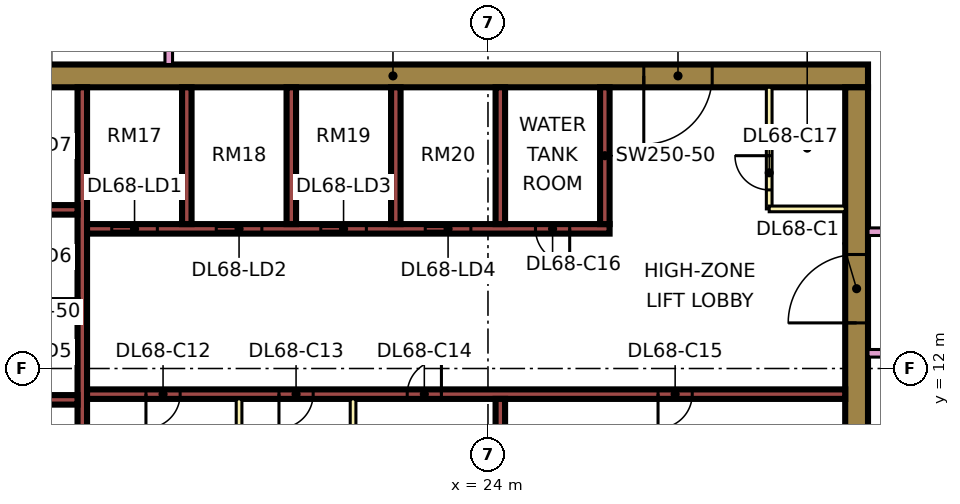
"""IFC4 building model, lengths in metres.
Left out: names, types, materials, properties, quantities, classifications, styles, units other than length and angle.
Written with IfcOpenShell. Run it as: python <this file> out.ifc"""

import sys

from ifc_helpers import new_model, si_unit, direction, frame, frame_2d, origin, place, context, subcontext, project, spatial, rectangle, extrude, element, fill, save


model = new_model("IFC4")
c1 = context("Model", 3, precision=1e-05, world=origin(), true_north=direction((0.0, 1.0)))
c2 = subcontext(c1, "Body", "Model", "MODEL_VIEW")
j1 = project(units=[si_unit("LENGTHUNIT", "METRE"), si_unit("PLANEANGLEUNIT", "RADIAN")], contexts=[c1])
p1 = place(None, origin())
s1 = spatial("IfcSite", under=j1, at=p1, CompositionType="ELEMENT")
p2 = place(p1, origin())
s2 = spatial("IfcBuilding", under=s1, at=p2, CompositionType="ELEMENT")
p3 = place(p2, frame((0.0, 0.0, 292.15)))
s3 = spatial("IfcBuildingStorey", under=s2, at=p3, CompositionType="ELEMENT", Elevation=292.15)
p4 = place(p3, frame((9.0, 19.7, 0.0), z_axis=(0.0, 0.0, 1.0), x_axis=(1.0, 0.0, 0.0)))
e1 = element("IfcWall", 1, at=p4, inside=s3, PredefinedType="SHEAR", context=c2, shape_type="SweptSolid", body=[
    extrude(rectangle(XDim=25.0, YDim=0.6, at=frame_2d((12.5, 0.0))), origin(), (0.0, 0.0, 1.0), 3.75),
])
p5 = place(p4, frame((19.1, 0.0, 0.0)))
e2 = element("IfcOpeningElement", 2, at=p5, cuts=e1, PredefinedType="OPENING", context=c2, shape_type="SweptSolid", body=[
    extrude(rectangle(XDim=1.8, YDim=2.4, at=frame_2d((0.9, 1.2))), frame((0.0, 0.31, 0.0), z_axis=(0.0, -1.0, 0.0), x_axis=(1.0, 0.0, 0.0)), (0.0, 0.0, 1.0), 0.62),
])
p6 = place(p3, frame((33.7, 7.6, 0.0), z_axis=(0.0, 0.0, 1.0), x_axis=(0.0, 1.0, 0.0)))
e3 = element("IfcWall", 3, at=p6, inside=s3, PredefinedType="SHEAR", context=c2, shape_type="SweptSolid", body=[
    extrude(rectangle(XDim=11.8, YDim=0.6, at=frame_2d((5.9, 0.0))), origin(), (0.0, 0.0, 1.0), 3.75),
])
p7 = place(p6, frame((5.6, 0.0, 0.0)))
e4 = element("IfcOpeningElement", 4, at=p7, cuts=e3, PredefinedType="OPENING", context=c2, shape_type="SweptSolid", body=[
    extrude(rectangle(XDim=1.8, YDim=2.4, at=frame_2d((0.9, 1.2))), frame((0.0, 0.31, 0.0), z_axis=(0.0, -1.0, 0.0), x_axis=(1.0, 0.0, 0.0)), (0.0, 0.0, 1.0), 0.62),
])
p8 = place(p3, frame((13.325, 7.6, 0.0), z_axis=(0.0, 0.0, 1.0), x_axis=(0.0, 1.0, 0.0)))
e5 = element("IfcWall", 5, at=p8, inside=s3, PredefinedType="SHEAR", context=c2, shape_type="SweptSolid", body=[
    extrude(rectangle(XDim=11.8, YDim=0.25, at=frame_2d((5.9, 0.0))), origin(), (0.0, 0.0, 1.0), 3.75),
])
p9 = place(p3, frame((13.45, 11.325, 0.0), z_axis=(0.0, 0.0, 1.0), x_axis=(1.0, 0.0, 0.0)))
e6 = element("IfcWall", 6, at=p9, inside=s3, PredefinedType="SHEAR", context=c2, shape_type="SweptSolid", body=[
    extrude(rectangle(XDim=19.95, YDim=0.25, at=frame_2d((9.975, 0.0))), origin(), (0.0, 0.0, 1.0), 3.75),
])
p10 = place(p9, frame((1.55, 0.0, 0.0)))
e7 = element("IfcOpeningElement", 7, at=p10, cuts=e6, PredefinedType="OPENING", context=c2, shape_type="SweptSolid", body=[
    extrude(rectangle(XDim=0.9, YDim=2.1, at=frame_2d((0.45, 1.05))), frame((0.0, 0.135, 0.0), z_axis=(0.0, -1.0, 0.0), x_axis=(1.0, 0.0, 0.0)), (0.0, 0.0, 1.0), 0.27),
])
p11 = place(p9, frame((5.05, 0.0, 0.0)))
e8 = element("IfcOpeningElement", 8, at=p11, cuts=e6, PredefinedType="OPENING", context=c2, shape_type="SweptSolid", body=[
    extrude(rectangle(XDim=0.9, YDim=2.1, at=frame_2d((0.45, 1.05))), frame((0.0, 0.135, 0.0), z_axis=(0.0, -1.0, 0.0), x_axis=(1.0, 0.0, 0.0)), (0.0, 0.0, 1.0), 0.27),
])
p12 = place(p9, frame((8.425, 0.0, 0.0)))
e9 = element("IfcOpeningElement", 9, at=p12, cuts=e6, PredefinedType="OPENING", context=c2, shape_type="SweptSolid", body=[
    extrude(rectangle(XDim=0.9, YDim=2.1, at=frame_2d((0.45, 1.05))), frame((0.0, 0.135, 0.0), z_axis=(0.0, -1.0, 0.0), x_axis=(1.0, 0.0, 0.0)), (0.0, 0.0, 1.0), 0.27),
])
p13 = place(p9, frame((15.025, 0.0, 0.0)))
e10 = element("IfcOpeningElement", 10, at=p13, cuts=e6, PredefinedType="OPENING", context=c2, shape_type="SweptSolid", body=[
    extrude(rectangle(XDim=0.9, YDim=2.1, at=frame_2d((0.45, 1.05))), frame((0.0, 0.135, 0.0), z_axis=(0.0, -1.0, 0.0), x_axis=(1.0, 0.0, 0.0)), (0.0, 0.0, 1.0), 0.27),
])
p14 = place(p3, frame((13.45, 15.675, 0.0), z_axis=(0.0, 0.0, 1.0), x_axis=(1.0, 0.0, 0.0)))
e11 = element("IfcWall", 11, at=p14, inside=s3, PredefinedType="SHEAR", context=c2, shape_type="SweptSolid", body=[
    extrude(rectangle(XDim=13.75, YDim=0.25, at=frame_2d((6.875, 0.0))), origin(), (0.0, 0.0, 1.0), 3.75),
])
p15 = place(p14, frame((0.65, 0.0, 0.0)))
e12 = element("IfcOpeningElement", 12, at=p15, cuts=e11, PredefinedType="OPENING", context=c2, shape_type="SweptSolid", body=[
    extrude(rectangle(XDim=1.2, YDim=2.2, at=frame_2d((0.6, 1.1))), frame((0.0, 0.135, 0.0), z_axis=(0.0, -1.0, 0.0), x_axis=(1.0, 0.0, 0.0)), (0.0, 0.0, 1.0), 0.27),
])
p16 = place(p14, frame((3.4, 0.0, 0.0)))
e13 = element("IfcOpeningElement", 13, at=p16, cuts=e11, PredefinedType="OPENING", context=c2, shape_type="SweptSolid", body=[
    extrude(rectangle(XDim=1.2, YDim=2.2, at=frame_2d((0.6, 1.1))), frame((0.0, 0.135, 0.0), z_axis=(0.0, -1.0, 0.0), x_axis=(1.0, 0.0, 0.0)), (0.0, 0.0, 1.0), 0.27),
])
p17 = place(p14, frame((6.15, 0.0, 0.0)))
e14 = element("IfcOpeningElement", 14, at=p17, cuts=e11, PredefinedType="OPENING", context=c2, shape_type="SweptSolid", body=[
    extrude(rectangle(XDim=1.2, YDim=2.2, at=frame_2d((0.6, 1.1))), frame((0.0, 0.135, 0.0), z_axis=(0.0, -1.0, 0.0), x_axis=(1.0, 0.0, 0.0)), (0.0, 0.0, 1.0), 0.27),
])
p18 = place(p14, frame((8.9, 0.0, 0.0)))
e15 = element("IfcOpeningElement", 15, at=p18, cuts=e11, PredefinedType="OPENING", context=c2, shape_type="SweptSolid", body=[
    extrude(rectangle(XDim=1.2, YDim=2.2, at=frame_2d((0.6, 1.1))), frame((0.0, 0.135, 0.0), z_axis=(0.0, -1.0, 0.0), x_axis=(1.0, 0.0, 0.0)), (0.0, 0.0, 1.0), 0.27),
])
p19 = place(p14, frame((11.8, 0.0, 0.0)))
e16 = element("IfcOpeningElement", 16, at=p19, cuts=e11, PredefinedType="OPENING", context=c2, shape_type="SweptSolid", body=[
    extrude(rectangle(XDim=0.9, YDim=2.1, at=frame_2d((0.45, 1.05))), frame((0.0, 0.135, 0.0), z_axis=(0.0, -1.0, 0.0), x_axis=(1.0, 0.0, 0.0)), (0.0, 0.0, 1.0), 0.27),
])
for number, where, z_axis, x_axis in (
    (17, (10.2, 11.175, 0.0), (0.0, 0.0, 1.0), (1.0, 0.0, 0.0)),
    (18, (10.2, 13.675, 0.0), (0.0, 0.0, 1.0), (1.0, 0.0, 0.0)),
    (19, (10.2, 16.175, 0.0), (0.0, 0.0, 1.0), (1.0, 0.0, 0.0)),
):
    element("IfcWall", number, at=place(p3, frame(where, z_axis=z_axis, x_axis=x_axis)), inside=s3, PredefinedType="SHEAR", context=c2, shape_type="SweptSolid", body=[
        extrude(rectangle(XDim=3.0, YDim=0.25, at=frame_2d((1.5, 0.0))), origin(), (0.0, 0.0, 1.0), 3.75),
    ])
for number, where, z_axis, x_axis in (
    (20, (24.325, 7.6, 0.0), (0.0, 0.0, 1.0), (0.0, 1.0, 0.0)),
    (21, (16.075, 15.8, 0.0), (0.0, 0.0, 1.0), (0.0, 1.0, 0.0)),
    (22, (18.825, 15.8, 0.0), (0.0, 0.0, 1.0), (0.0, 1.0, 0.0)),
    (23, (21.575, 15.8, 0.0), (0.0, 0.0, 1.0), (0.0, 1.0, 0.0)),
    (24, (24.325, 15.8, 0.0), (0.0, 0.0, 1.0), (0.0, 1.0, 0.0)),
    (25, (27.075, 15.8, 0.0), (0.0, 0.0, 1.0), (0.0, 1.0, 0.0)),
):
    element("IfcWall", number, at=place(p3, frame(where, z_axis=z_axis, x_axis=x_axis)), inside=s3, PredefinedType="SHEAR", context=c2, shape_type="SweptSolid", body=[
        extrude(rectangle(XDim=3.6, YDim=0.25, at=frame_2d((1.8, 0.0))), origin(), (0.0, 0.0, 1.0), 3.75),
    ])
p20 = place(p3, frame((-1.447, 12.553, 0.0), z_axis=(0.0, 0.0, 1.0), x_axis=(0.707106781187, -0.707106781187, 0.0)))
e26 = element("IfcWall", 26, at=p20, inside=s3, PredefinedType="SOLIDWALL", context=c2, shape_type="SweptSolid", body=[
    extrude(rectangle(XDim=19.799, YDim=0.15, at=frame_2d((9.899, 0.0))), origin(), (0.0, 0.0, 1.0), 3.35),
])
p21 = place(p20, frame((2.212, 0.0, 0.45)))
e27 = element("IfcOpeningElement", 27, at=p21, cuts=e26, PredefinedType="OPENING", context=c2, shape_type="SweptSolid", body=[
    extrude(rectangle(XDim=3.0, YDim=2.4, at=frame_2d((1.5, 1.2))), frame((0.0, 0.085, 0.0), z_axis=(0.0, -1.0, 0.0), x_axis=(1.0, 0.0, 0.0)), (0.0, 0.0, 1.0), 0.17),
])
p22 = place(p20, frame((10.216, 0.0, 0.45)))
e28 = element("IfcOpeningElement", 28, at=p22, cuts=e26, PredefinedType="OPENING", context=c2, shape_type="SweptSolid", body=[
    extrude(rectangle(XDim=3.0, YDim=2.4, at=frame_2d((1.5, 1.2))), frame((0.0, 0.085, 0.0), z_axis=(0.0, -1.0, 0.0), x_axis=(1.0, 0.0, 0.0)), (0.0, 0.0, 1.0), 0.17),
])
for number, where, z_axis, x_axis in (
    (29, (17.45, 7.6, 0.0), (0.0, 0.0, 1.0), (0.0, 1.0, 0.0)),
    (30, (20.45, 7.6, 0.0), (0.0, 0.0, 1.0), (0.0, 1.0, 0.0)),
):
    element("IfcWall", number, at=place(p3, frame(where, z_axis=z_axis, x_axis=x_axis)), inside=s3, PredefinedType="PARTITIONING", context=c2, shape_type="SweptSolid", body=[
        extrude(rectangle(XDim=3.6, YDim=0.15, at=frame_2d((1.8, 0.0))), origin(), (0.0, 0.0, 1.0), 3.35),
    ])
p23 = place(p3, frame((31.4, 16.2, 0.0), z_axis=(0.0, 0.0, 1.0), x_axis=(0.0, 1.0, 0.0)))
e31 = element("IfcWall", 31, at=p23, inside=s3, PredefinedType="PARTITIONING", context=c2, shape_type="SweptSolid", body=[
    extrude(rectangle(XDim=3.2, YDim=0.15, at=frame_2d((1.6, 0.0))), origin(), (0.0, 0.0, 1.0), 3.35),
])
p24 = place(p23, frame((0.5, 0.0, 0.0)))
e32 = element("IfcOpeningElement", 32, at=p24, cuts=e31, PredefinedType="OPENING", context=c2, shape_type="SweptSolid", body=[
    extrude(rectangle(XDim=0.9, YDim=2.1, at=frame_2d((0.45, 1.05))), frame((0.0, 0.085, 0.0), z_axis=(0.0, -1.0, 0.0), x_axis=(1.0, 0.0, 0.0)), (0.0, 0.0, 1.0), 0.17),
])
p25 = place(p3, frame((31.4, 16.2, 0.0), z_axis=(0.0, 0.0, 1.0), x_axis=(1.0, 0.0, 0.0)))
e33 = element("IfcWall", 33, at=p25, inside=s3, PredefinedType="PARTITIONING", context=c2, shape_type="SweptSolid", body=[
    extrude(rectangle(XDim=2.0, YDim=0.15, at=frame_2d((1.0, 0.0))), origin(), (0.0, 0.0, 1.0), 3.35),
])
p26 = place(p3, frame((15.6, 20.0, 0.0), z_axis=(0.0, 0.0, 1.0), x_axis=(0.0, 1.0, 0.0)))
e34 = element("IfcWall", 34, at=p26, inside=s3, PredefinedType="PARTITIONING", context=c2, shape_type="SweptSolid", body=[
    extrude(rectangle(XDim=27.775, YDim=0.2, at=frame_2d((13.887, 0.0))), origin(), (0.0, 0.0, 1.0), 3.35),
])
p27 = place(p26, frame((7.15, 0.0, 0.0)))
e35 = element("IfcOpeningElement", 35, at=p27, cuts=e34, PredefinedType="OPENING", context=c2, shape_type="SweptSolid", body=[
    extrude(rectangle(XDim=1.6, YDim=2.1, at=frame_2d((0.8, 1.05))), frame((0.0, 0.11, 0.0), z_axis=(0.0, -1.0, 0.0), x_axis=(1.0, 0.0, 0.0)), (0.0, 0.0, 1.0), 0.22),
])
p28 = place(p26, frame((13.5, 0.0, 0.0)))
e36 = element("IfcOpeningElement", 36, at=p28, cuts=e34, PredefinedType="OPENING", context=c2, shape_type="SweptSolid", body=[
    extrude(rectangle(XDim=1.0, YDim=2.1, at=frame_2d((0.5, 1.05))), frame((0.0, 0.11, 0.0), z_axis=(0.0, -1.0, 0.0), x_axis=(1.0, 0.0, 0.0)), (0.0, 0.0, 1.0), 0.22),
])
p29 = place(p26, frame((22.75, 0.0, 0.0)))
e37 = element("IfcOpeningElement", 37, at=p29, cuts=e34, PredefinedType="OPENING", context=c2, shape_type="SweptSolid", body=[
    extrude(rectangle(XDim=1.0, YDim=2.1, at=frame_2d((0.5, 1.05))), frame((0.0, 0.11, 0.0), z_axis=(0.0, -1.0, 0.0), x_axis=(1.0, 0.0, 0.0)), (0.0, 0.0, 1.0), 0.22),
])
p30 = place(p26, frame((1.15, 0.0, 0.0)))
e38 = element("IfcOpeningElement", 38, at=p30, cuts=e34, PredefinedType="OPENING", context=c2, shape_type="SweptSolid", body=[
    extrude(rectangle(XDim=1.8, YDim=2.1, at=frame_2d((0.9, 1.05))), frame((0.0, 0.11, 0.0), z_axis=(0.0, -1.0, 0.0), x_axis=(1.0, 0.0, 0.0)), (0.0, 0.0, 1.0), 0.22),
])
p31 = place(p26, frame((25.9, 0.0, 0.0)))
e39 = element("IfcOpeningElement", 39, at=p31, cuts=e34, PredefinedType="OPENING", context=c2, shape_type="SweptSolid", body=[
    extrude(rectangle(XDim=1.0, YDim=2.1, at=frame_2d((0.5, 1.05))), frame((0.0, 0.11, 0.0), z_axis=(0.0, -1.0, 0.0), x_axis=(1.0, 0.0, 0.0)), (0.0, 0.0, 1.0), 0.22),
])
p32 = place(p3, frame((34.0, 12.4, 0.0), z_axis=(0.0, 0.0, 1.0), x_axis=(1.0, 0.0, 0.0)))
e40 = element("IfcWall", 40, at=p32, inside=s3, PredefinedType="PARTITIONING", context=c2, shape_type="SweptSolid", body=[
    extrude(rectangle(XDim=2.401, YDim=0.2, at=frame_2d((1.2, 0.0))), origin(), (0.0, 0.0, 1.0), 3.35),
])
p33 = place(p3, frame((34.0, 15.6, 0.0), z_axis=(0.0, 0.0, 1.0), x_axis=(1.0, 0.0, 0.0)))
e41 = element("IfcWall", 41, at=p33, inside=s3, PredefinedType="PARTITIONING", context=c2, shape_type="SweptSolid", body=[
    extrude(rectangle(XDim=10.35, YDim=0.2, at=frame_2d((5.175, 0.0))), origin(), (0.0, 0.0, 1.0), 3.35),
])
p34 = place(p33, frame((5.6, 0.0, 0.0)))
e42 = element("IfcOpeningElement", 42, at=p34, cuts=e41, PredefinedType="OPENING", context=c2, shape_type="SweptSolid", body=[
    extrude(rectangle(XDim=1.0, YDim=2.1, at=frame_2d((0.5, 1.05))), frame((0.0, 0.11, 0.0), z_axis=(0.0, -1.0, 0.0), x_axis=(1.0, 0.0, 0.0)), (0.0, 0.0, 1.0), 0.22),
])
p35 = place(p33, frame((0.45, 0.0, 0.0)))
e43 = element("IfcOpeningElement", 43, at=p35, cuts=e41, PredefinedType="OPENING", context=c2, shape_type="SweptSolid", body=[
    extrude(rectangle(XDim=1.2, YDim=2.1, at=frame_2d((0.6, 1.05))), frame((0.0, 0.11, 0.0), z_axis=(0.0, -1.0, 0.0), x_axis=(1.0, 0.0, 0.0)), (0.0, 0.0, 1.0), 0.22),
])
p36 = place(p15, origin())
e44 = element("IfcDoor", 44, at=p36, inside=s3, OperationType="DOUBLE_DOOR_SLIDING", PredefinedType="DOOR", context=c2, shape_type="SweptSolid", body=[
    extrude(rectangle(XDim=1.2, YDim=2.2, at=frame_2d((0.6, 1.1))), frame((0.0, 0.025, 0.0), z_axis=(0.0, -1.0, 0.0), x_axis=(1.0, 0.0, 0.0)), (0.0, 0.0, 1.0), 0.05),
])
fill(e12, e44)
p37 = place(p16, origin())
e45 = element("IfcDoor", 45, at=p37, inside=s3, OperationType="DOUBLE_DOOR_SLIDING", PredefinedType="DOOR", context=c2, shape_type="SweptSolid", body=[
    extrude(rectangle(XDim=1.2, YDim=2.2, at=frame_2d((0.6, 1.1))), frame((0.0, 0.025, 0.0), z_axis=(0.0, -1.0, 0.0), x_axis=(1.0, 0.0, 0.0)), (0.0, 0.0, 1.0), 0.05),
])
fill(e13, e45)
p38 = place(p17, origin())
e46 = element("IfcDoor", 46, at=p38, inside=s3, OperationType="DOUBLE_DOOR_SLIDING", PredefinedType="DOOR", context=c2, shape_type="SweptSolid", body=[
    extrude(rectangle(XDim=1.2, YDim=2.2, at=frame_2d((0.6, 1.1))), frame((0.0, 0.025, 0.0), z_axis=(0.0, -1.0, 0.0), x_axis=(1.0, 0.0, 0.0)), (0.0, 0.0, 1.0), 0.05),
])
fill(e14, e46)
p39 = place(p18, origin())
e47 = element("IfcDoor", 47, at=p39, inside=s3, OperationType="DOUBLE_DOOR_SLIDING", PredefinedType="DOOR", context=c2, shape_type="SweptSolid", body=[
    extrude(rectangle(XDim=1.2, YDim=2.2, at=frame_2d((0.6, 1.1))), frame((0.0, 0.025, 0.0), z_axis=(0.0, -1.0, 0.0), x_axis=(1.0, 0.0, 0.0)), (0.0, 0.0, 1.0), 0.05),
])
fill(e15, e47)
p40 = place(p7, origin())
e48 = element("IfcDoor", 48, at=p40, inside=s3, OperationType="DOUBLE_DOOR_SINGLE_SWING", PredefinedType="DOOR", context=c2, shape_type="SweptSolid", body=[
    extrude(rectangle(XDim=1.8, YDim=2.4, at=frame_2d((0.9, 1.2))), frame((0.0, 0.025, 0.0), z_axis=(0.0, -1.0, 0.0), x_axis=(1.0, 0.0, 0.0)), (0.0, 0.0, 1.0), 0.05),
])
fill(e4, e48)
p41 = place(p5, frame((1.8, 0.0, 0.0), z_axis=(0.0, 0.0, 1.0), x_axis=(-1.0, 0.0, 0.0)))
e49 = element("IfcDoor", 49, at=p41, inside=s3, OperationType="DOUBLE_DOOR_SINGLE_SWING", PredefinedType="DOOR", context=c2, shape_type="SweptSolid", body=[
    extrude(rectangle(XDim=1.8, YDim=2.4, at=frame_2d((0.9, 1.2))), frame((0.0, 0.025, 0.0), z_axis=(0.0, -1.0, 0.0), x_axis=(1.0, 0.0, 0.0)), (0.0, 0.0, 1.0), 0.05),
])
fill(e2, e49)
p42 = place(p10, frame((0.9, 0.0, 0.0), z_axis=(0.0, 0.0, 1.0), x_axis=(-1.0, 0.0, 0.0)))
e50 = element("IfcDoor", 50, at=p42, inside=s3, OperationType="SINGLE_SWING_LEFT", PredefinedType="DOOR", context=c2, shape_type="SweptSolid", body=[
    extrude(rectangle(XDim=0.9, YDim=2.1, at=frame_2d((0.45, 1.05))), frame((0.0, 0.025, 0.0), z_axis=(0.0, -1.0, 0.0), x_axis=(1.0, 0.0, 0.0)), (0.0, 0.0, 1.0), 0.05),
])
fill(e7, e50)
p43 = place(p11, frame((0.9, 0.0, 0.0), z_axis=(0.0, 0.0, 1.0), x_axis=(-1.0, 0.0, 0.0)))
e51 = element("IfcDoor", 51, at=p43, inside=s3, OperationType="SINGLE_SWING_LEFT", PredefinedType="DOOR", context=c2, shape_type="SweptSolid", body=[
    extrude(rectangle(XDim=0.9, YDim=2.1, at=frame_2d((0.45, 1.05))), frame((0.0, 0.025, 0.0), z_axis=(0.0, -1.0, 0.0), x_axis=(1.0, 0.0, 0.0)), (0.0, 0.0, 1.0), 0.05),
])
fill(e8, e51)
p44 = place(p12, frame((0.9, 0.0, 0.0), z_axis=(0.0, 0.0, 1.0), x_axis=(-1.0, 0.0, 0.0)))
e52 = element("IfcDoor", 52, at=p44, inside=s3, OperationType="SINGLE_SWING_RIGHT", PredefinedType="DOOR", context=c2, shape_type="SweptSolid", body=[
    extrude(rectangle(XDim=0.9, YDim=2.1, at=frame_2d((0.45, 1.05))), frame((0.0, 0.025, 0.0), z_axis=(0.0, -1.0, 0.0), x_axis=(1.0, 0.0, 0.0)), (0.0, 0.0, 1.0), 0.05),
])
fill(e9, e52)
p45 = place(p13, frame((0.9, 0.0, 0.0), z_axis=(0.0, 0.0, 1.0), x_axis=(-1.0, 0.0, 0.0)))
e53 = element("IfcDoor", 53, at=p45, inside=s3, OperationType="SINGLE_SWING_LEFT", PredefinedType="DOOR", context=c2, shape_type="SweptSolid", body=[
    extrude(rectangle(XDim=0.9, YDim=2.1, at=frame_2d((0.45, 1.05))), frame((0.0, 0.025, 0.0), z_axis=(0.0, -1.0, 0.0), x_axis=(1.0, 0.0, 0.0)), (0.0, 0.0, 1.0), 0.05),
])
fill(e10, e53)
p46 = place(p19, origin())
e54 = element("IfcDoor", 54, at=p46, inside=s3, OperationType="SINGLE_SWING_RIGHT", PredefinedType="DOOR", context=c2, shape_type="SweptSolid", body=[
    extrude(rectangle(XDim=0.9, YDim=2.1, at=frame_2d((0.45, 1.05))), frame((0.0, 0.025, 0.0), z_axis=(0.0, -1.0, 0.0), x_axis=(1.0, 0.0, 0.0)), (0.0, 0.0, 1.0), 0.05),
])
fill(e16, e54)
p47 = place(p24, frame((0.9, 0.0, 0.0), z_axis=(0.0, 0.0, 1.0), x_axis=(-1.0, 0.0, 0.0)))
e55 = element("IfcDoor", 55, at=p47, inside=s3, OperationType="SINGLE_SWING_RIGHT", PredefinedType="DOOR", context=c2, shape_type="SweptSolid", body=[
    extrude(rectangle(XDim=0.9, YDim=2.1, at=frame_2d((0.45, 1.05))), frame((0.0, 0.025, 0.0), z_axis=(0.0, -1.0, 0.0), x_axis=(1.0, 0.0, 0.0)), (0.0, 0.0, 1.0), 0.05),
])
fill(e32, e55)
save(model, sys.argv[1])
